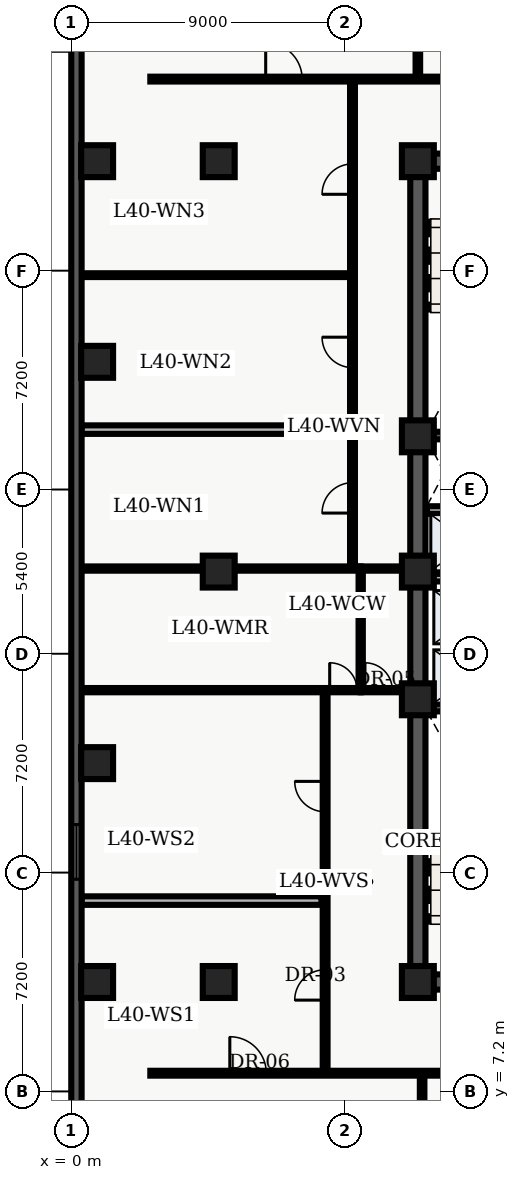
"""IFC4 building model, lengths in metres.
Left out: names, types, materials, properties, quantities, classifications, styles, units other than length and angle.
Written with IfcOpenShell. Run it as: python <this file> out.ifc"""

import sys

from ifc_helpers import new_model, entity, si_unit, converted_unit, direction, frame, origin_with_axes, origin_2d_with_axis, place, context, subcontext, project, spatial, polyline, rectangle, outline, extrude, element, fill, save


model = new_model("IFC4")
c1 = context("Model", 3, precision=1e-05, world=origin_with_axes(), true_north=direction((0.0, 1.0)))
c2 = subcontext(c1, "Body", "Model", "MODEL_VIEW")
j1 = project(units=[si_unit("LENGTHUNIT", "METRE"), converted_unit("PLANEANGLEUNIT", "DEGREE", entity("IfcPlaneAngleMeasure", 0.017), si_unit("PLANEANGLEUNIT", "RADIAN"), dimensions=[0, 0, 0, 0, 0, 0, 0])], contexts=[c1])
p1 = place(None, origin_with_axes())
s1 = spatial("IfcSite", under=j1, at=p1, CompositionType="ELEMENT")
p2 = place(p1, origin_with_axes())
s2 = spatial("IfcBuilding", under=s1, at=p2, CompositionType="ELEMENT")
p3 = place(p2, frame((0.0, 0.0, 164.1), z_axis=(0.0, 0.0, 1.0), x_axis=(1.0, 0.0, 0.0)))
s3 = spatial("IfcBuildingStorey", under=s2, at=p3, CompositionType="ELEMENT", Elevation=164.1)
p4 = place(p3, frame((11.4, 10.8, 0.0), z_axis=(0.0, 0.0, 1.0), x_axis=(0.0, 1.0, 0.0)))
e1 = element("IfcWall", 1, at=p4, inside=s3, PredefinedType="SHEAR", context=c2, shape_type="SweptSolid", body=[
    extrude(outline(polyline([(0.0, -0.25), (27.0, -0.25), (27.0, 0.25), (0.0, 0.25), (0.0, -0.25)])), origin_with_axes(), (0.0, 0.0, 1.0), 3.66),
])
p5 = place(p3, frame((11.4, 10.8, 0.0), z_axis=(0.0, 0.0, 1.0), x_axis=(1.0, 0.0, 0.0)))
e2 = element("IfcWall", 2, at=p5, inside=s3, PredefinedType="SHEAR", context=c2, shape_type="SweptSolid", body=[
    extrude(outline(polyline([(0.0, -0.25), (7.2, -0.25), (7.2, 0.25), (0.0, 0.25), (0.0, -0.25)])), origin_with_axes(), (0.0, 0.0, 1.0), 3.66),
])
p6 = place(p5, frame((2.625, 0.0, 0.0), z_axis=(0.0, 0.0, 1.0), x_axis=(1.0, 0.0, 0.0)))
e3 = element("IfcOpeningElement", 3, at=p6, cuts=e2, PredefinedType="OPENING", context=c2, shape_type="SweptSolid", body=[
    extrude(rectangle(XDim=1.05, YDim=0.52, at=origin_2d_with_axis()), origin_with_axes(), (0.0, 0.0, 1.0), 2.15),
])
p7 = place(p3, frame((11.4, 37.8, 0.0), z_axis=(0.0, 0.0, 1.0), x_axis=(1.0, 0.0, 0.0)))
e4 = element("IfcWall", 4, at=p7, inside=s3, PredefinedType="SHEAR", context=c2, shape_type="SweptSolid", body=[
    extrude(outline(polyline([(0.0, -0.25), (7.2, -0.25), (7.2, 0.25), (0.0, 0.25), (0.0, -0.25)])), origin_with_axes(), (0.0, 0.0, 1.0), 3.66),
])
p8 = place(p7, frame((2.625, 0.0, 0.0), z_axis=(0.0, 0.0, 1.0), x_axis=(1.0, 0.0, 0.0)))
e5 = element("IfcOpeningElement", 5, at=p8, cuts=e4, PredefinedType="OPENING", context=c2, shape_type="SweptSolid", body=[
    extrude(rectangle(XDim=1.05, YDim=0.52, at=origin_2d_with_axis()), origin_with_axes(), (0.0, 0.0, 1.0), 2.15),
])
for number, where, z_axis, x_axis in (
    (6, (11.65, 19.825, 0.0), (0.0, 0.0, 1.0), (1.0, 0.0, 0.0)),
    (7, (11.65, 28.775, 0.0), (0.0, 0.0, 1.0), (1.0, 0.0, 0.0)),
):
    element("IfcWall", number, at=place(p3, frame(where, z_axis=z_axis, x_axis=x_axis)), inside=s3, PredefinedType="SHEAR", context=c2, shape_type="SweptSolid", body=[
        extrude(outline(polyline([(0.0, -0.125), (6.7, -0.125), (6.7, 0.125), (0.0, 0.125), (0.0, -0.125)])), origin_with_axes(), (0.0, 0.0, 1.0), 3.66),
    ])
p9 = place(p3, frame((11.7, 24.1, 0.0), z_axis=(0.0, 0.0, 1.0), x_axis=(1.0, 0.0, 0.0)))
e8 = element("IfcWall", 8, at=p9, inside=s3, PredefinedType="SOLIDWALL", context=c2, shape_type="SweptSolid", body=[
    extrude(outline(polyline([(0.0, -0.125), (6.6, -0.125), (6.6, 0.125), (0.0, 0.125), (0.0, -0.125)])), origin_with_axes(), (0.0, 0.0, 1.0), 2.7),
])
p10 = place(p9, frame((3.75, 0.0, 0.0), z_axis=(0.0, 0.0, 1.0), x_axis=(1.0, 0.0, 0.0)))
e9 = element("IfcOpeningElement", 9, at=p10, cuts=e8, PredefinedType="OPENING", context=c2, shape_type="SweptSolid", body=[
    extrude(rectangle(XDim=0.9, YDim=0.27, at=origin_2d_with_axis()), origin_with_axes(), (0.0, 0.0, 1.0), 2.15),
])
p11 = place(p3, frame((11.7, 26.325, 0.0), z_axis=(0.0, 0.0, 1.0), x_axis=(1.0, 0.0, 0.0)))
e10 = element("IfcWall", 10, at=p11, inside=s3, PredefinedType="SOLIDWALL", context=c2, shape_type="SweptSolid", body=[
    extrude(outline(polyline([(0.0, -0.125), (6.6, -0.125), (6.6, 0.125), (0.0, 0.125), (0.0, -0.125)])), origin_with_axes(), (0.0, 0.0, 1.0), 2.7),
])
p12 = place(p11, frame((3.5, 0.0, 0.0), z_axis=(0.0, 0.0, 1.0), x_axis=(1.0, 0.0, 0.0)))
e11 = element("IfcOpeningElement", 11, at=p12, cuts=e10, PredefinedType="OPENING", context=c2, shape_type="SweptSolid", body=[
    extrude(rectangle(XDim=0.9, YDim=0.27, at=origin_2d_with_axis()), origin_with_axes(), (0.0, 0.0, 1.0), 2.15),
])
for number, where, z_axis, x_axis in (
    (12, (11.4, 10.8, 0.0), (0.0, 0.0, 1.0), (1.0, 0.0, 0.0)),
    (13, (11.4, 20.1, 0.0), (0.0, 0.0, 1.0), (1.0, 0.0, 0.0)),
    (14, (11.4, 24.3, 0.0), (0.0, 0.0, 1.0), (1.0, 0.0, 0.0)),
    (15, (11.4, 28.75, 0.0), (0.0, 0.0, 1.0), (1.0, 0.0, 0.0)),
    (16, (11.4, 37.8, 0.0), (0.0, 0.0, 1.0), (1.0, 0.0, 0.0)),
    (17, (4.85, 10.8, 0.0), (0.0, 0.0, 1.0), (1.0, 0.0, 0.0)),
    (18, (4.85, 24.3, 0.0), (0.0, 0.0, 1.0), (1.0, 0.0, 0.0)),
    (19, (4.85, 37.8, 0.0), (0.0, 0.0, 1.0), (1.0, 0.0, 0.0)),
    (20, (0.85, 10.8, 0.0), (0.0, 0.0, 1.0), (1.0, 0.0, 0.0)),
    (21, (0.85, 18.0, 0.0), (0.0, 0.0, 1.0), (1.0, 0.0, 0.0)),
    (22, (0.85, 31.2, 0.0), (0.0, 0.0, 1.0), (1.0, 0.0, 0.0)),
    (23, (0.85, 37.8, 0.0), (0.0, 0.0, 1.0), (1.0, 0.0, 0.0)),
):
    element("IfcColumn", number, at=place(p3, frame(where, z_axis=z_axis, x_axis=x_axis)), inside=s3, PredefinedType="COLUMN", context=c2, shape_type="SweptSolid", body=[
        extrude(rectangle(XDim=1.05, YDim=1.05, at=origin_2d_with_axis()), origin_with_axes(), (0.0, 0.0, 1.0), 3.9),
    ])
p13 = place(p3, frame((9.52, 20.4, 0.0), z_axis=(0.0, 0.0, 1.0), x_axis=(0.0, 1.0, 0.0)))
e24 = element("IfcWall", 24, at=p13, inside=s3, PredefinedType="PARTITIONING", context=c2, shape_type="SweptSolid", body=[
    extrude(outline(polyline([(0.0, -0.07), (4.0, -0.07), (4.0, 0.07), (0.0, 0.07), (0.0, -0.07)])), origin_with_axes(), (0.0, 0.0, 1.0), 2.7),
])
p14 = place(p3, frame((9.52, 20.4, 0.0), z_axis=(0.0, 0.0, 1.0), x_axis=(1.0, 0.0, 0.0)))
e25 = element("IfcWall", 25, at=p14, inside=s3, PredefinedType="PARTITIONING", context=c2, shape_type="SweptSolid", body=[
    extrude(outline(polyline([(0.0, -0.07), (1.58, -0.07), (1.58, 0.07), (0.0, 0.07), (0.0, -0.07)])), origin_with_axes(), (0.0, 0.0, 1.0), 2.7),
])
p15 = place(p14, frame((0.59, 0.0, 0.0), z_axis=(0.0, 0.0, 1.0), x_axis=(1.0, 0.0, 0.0)))
e26 = element("IfcOpeningElement", 26, at=p15, cuts=e25, PredefinedType="OPENING", context=c2, shape_type="SweptSolid", body=[
    extrude(rectangle(XDim=0.9, YDim=0.16, at=origin_2d_with_axis()), origin_with_axes(), (0.0, 0.0, 1.0), 2.15),
])
p16 = place(p3, frame((9.52, 24.4, 0.0), z_axis=(0.0, 0.0, 1.0), x_axis=(1.0, 0.0, 0.0)))
e27 = element("IfcWall", 27, at=p16, inside=s3, PredefinedType="PARTITIONING", context=c2, shape_type="SweptSolid", body=[
    extrude(outline(polyline([(0.0, -0.07), (1.58, -0.07), (1.58, 0.07), (0.0, 0.07), (0.0, -0.07)])), origin_with_axes(), (0.0, 0.0, 1.0), 2.7),
])
p17 = place(p3, frame((2.6, 7.8, 0.0), z_axis=(0.0, 0.0, 1.0), x_axis=(1.0, 0.0, 0.0)))
e28 = element("IfcWall", 28, at=p17, inside=s3, PredefinedType="PARTITIONING", context=c2, shape_type="SweptSolid", body=[
    extrude(outline(polyline([(0.0, -0.08), (18.55, -0.08), (18.55, 0.08), (0.0, 0.08), (0.0, -0.08)])), origin_with_axes(), (0.0, 0.0, 1.0), 2.7),
])
p18 = place(p17, frame((3.215, 0.0, 0.0), z_axis=(0.0, 0.0, 1.0), x_axis=(1.0, 0.0, 0.0)))
e29 = element("IfcOpeningElement", 29, at=p18, cuts=e28, PredefinedType="OPENING", context=c2, shape_type="SweptSolid", body=[
    extrude(rectangle(XDim=1.2, YDim=0.18, at=origin_2d_with_axis()), origin_with_axes(), (0.0, 0.0, 1.0), 2.2),
])
p19 = place(p17, frame((11.107, 0.0, 0.0), z_axis=(0.0, 0.0, 1.0), x_axis=(1.0, 0.0, 0.0)))
e30 = element("IfcOpeningElement", 30, at=p19, cuts=e28, PredefinedType="OPENING", context=c2, shape_type="SweptSolid", body=[
    extrude(rectangle(XDim=1.0, YDim=0.18, at=origin_2d_with_axis()), origin_with_axes(), (0.0, 0.0, 1.0), 2.15),
])
p20 = place(p17, frame((15.886, 0.0, 0.0), z_axis=(0.0, 0.0, 1.0), x_axis=(1.0, 0.0, 0.0)))
e31 = element("IfcOpeningElement", 31, at=p20, cuts=e28, PredefinedType="OPENING", context=c2, shape_type="SweptSolid", body=[
    extrude(rectangle(XDim=1.0, YDim=0.18, at=origin_2d_with_axis()), origin_with_axes(), (0.0, 0.0, 1.0), 2.15),
])
p21 = place(p3, frame((2.6, 40.5, 0.0), z_axis=(0.0, 0.0, 1.0), x_axis=(1.0, 0.0, 0.0)))
e32 = element("IfcWall", 32, at=p21, inside=s3, PredefinedType="PARTITIONING", context=c2, shape_type="SweptSolid", body=[
    extrude(outline(polyline([(0.0, -0.08), (20.884, -0.08), (20.884, 0.08), (0.0, 0.08), (0.0, -0.08)])), origin_with_axes(), (0.0, 0.0, 1.0), 2.7),
])
p22 = place(p21, frame((4.395, 0.0, 0.0), z_axis=(0.0, 0.0, 1.0), x_axis=(1.0, 0.0, 0.0)))
e33 = element("IfcOpeningElement", 33, at=p22, cuts=e32, PredefinedType="OPENING", context=c2, shape_type="SweptSolid", body=[
    extrude(rectangle(XDim=1.2, YDim=0.18, at=origin_2d_with_axis()), origin_with_axes(), (0.0, 0.0, 1.0), 2.2),
])
p23 = place(p21, frame((13.16, 0.0, 0.0), z_axis=(0.0, 0.0, 1.0), x_axis=(1.0, 0.0, 0.0)))
e34 = element("IfcOpeningElement", 34, at=p23, cuts=e32, PredefinedType="OPENING", context=c2, shape_type="SweptSolid", body=[
    extrude(rectangle(XDim=1.0, YDim=0.18, at=origin_2d_with_axis()), origin_with_axes(), (0.0, 0.0, 1.0), 2.15),
])
p24 = place(p3, frame((8.35, 7.8, 0.0), z_axis=(0.0, 0.0, 1.0), x_axis=(0.0, 1.0, 0.0)))
e35 = element("IfcWall", 35, at=p24, inside=s3, PredefinedType="PARTITIONING", context=c2, shape_type="SweptSolid", body=[
    extrude(outline(polyline([(0.0, -0.08), (12.6, -0.08), (12.6, 0.08), (0.0, 0.08), (0.0, -0.08)])), origin_with_axes(), (0.0, 0.0, 1.0), 2.7),
])
p25 = place(p24, frame((2.904, 0.0, 0.0), z_axis=(0.0, 0.0, 1.0), x_axis=(1.0, 0.0, 0.0)))
e36 = element("IfcOpeningElement", 36, at=p25, cuts=e35, PredefinedType="OPENING", context=c2, shape_type="SweptSolid", body=[
    extrude(rectangle(XDim=1.0, YDim=0.18, at=origin_2d_with_axis()), origin_with_axes(), (0.0, 0.0, 1.0), 2.15),
])
p26 = place(p24, frame((9.099, 0.0, 0.0), z_axis=(0.0, 0.0, 1.0), x_axis=(1.0, 0.0, 0.0)))
e37 = element("IfcOpeningElement", 37, at=p26, cuts=e35, PredefinedType="OPENING", context=c2, shape_type="SweptSolid", body=[
    extrude(rectangle(XDim=1.0, YDim=0.18, at=origin_2d_with_axis()), origin_with_axes(), (0.0, 0.0, 1.0), 2.15),
])
p27 = place(p3, frame((9.25, 24.4, 0.0), z_axis=(0.0, 0.0, 1.0), x_axis=(0.0, 1.0, 0.0)))
e38 = element("IfcWall", 38, at=p27, inside=s3, PredefinedType="PARTITIONING", context=c2, shape_type="SweptSolid", body=[
    extrude(outline(polyline([(0.0, -0.08), (16.1, -0.08), (16.1, 0.08), (0.0, 0.08), (0.0, -0.08)])), origin_with_axes(), (0.0, 0.0, 1.0), 2.7),
])
p28 = place(p27, frame((2.325, 0.0, 0.0), z_axis=(0.0, 0.0, 1.0), x_axis=(1.0, 0.0, 0.0)))
e39 = element("IfcOpeningElement", 39, at=p28, cuts=e38, PredefinedType="OPENING", context=c2, shape_type="SweptSolid", body=[
    extrude(rectangle(XDim=1.0, YDim=0.18, at=origin_2d_with_axis()), origin_with_axes(), (0.0, 0.0, 1.0), 2.15),
])
p29 = place(p27, frame((7.111, 0.0, 0.0), z_axis=(0.0, 0.0, 1.0), x_axis=(1.0, 0.0, 0.0)))
e40 = element("IfcOpeningElement", 40, at=p29, cuts=e38, PredefinedType="OPENING", context=c2, shape_type="SweptSolid", body=[
    extrude(rectangle(XDim=1.0, YDim=0.18, at=origin_2d_with_axis()), origin_with_axes(), (0.0, 0.0, 1.0), 2.15),
])
p30 = place(p27, frame((12.81, 0.0, 0.0), z_axis=(0.0, 0.0, 1.0), x_axis=(1.0, 0.0, 0.0)))
e41 = element("IfcOpeningElement", 41, at=p30, cuts=e38, PredefinedType="OPENING", context=c2, shape_type="SweptSolid", body=[
    extrude(rectangle(XDim=1.0, YDim=0.18, at=origin_2d_with_axis()), origin_with_axes(), (0.0, 0.0, 1.0), 2.15),
])
p31 = place(p3, frame((0.335, 20.4, 0.0), z_axis=(0.0, 0.0, 1.0), x_axis=(1.0, 0.0, 0.0)))
e42 = element("IfcWall", 42, at=p31, inside=s3, PredefinedType="PARTITIONING", context=c2, shape_type="SweptSolid", body=[
    extrude(outline(polyline([(0.0, -0.07), (9.185, -0.07), (9.185, 0.07), (0.0, 0.07), (0.0, -0.07)])), origin_with_axes(), (0.0, 0.0, 1.0), 2.7),
])
p32 = place(p31, frame((8.615, 0.0, 0.0), z_axis=(0.0, 0.0, 1.0), x_axis=(1.0, 0.0, 0.0)))
e43 = element("IfcOpeningElement", 43, at=p32, cuts=e42, PredefinedType="OPENING", context=c2, shape_type="SweptSolid", body=[
    extrude(rectangle(XDim=0.9, YDim=0.16, at=origin_2d_with_axis()), origin_with_axes(), (0.0, 0.0, 1.0), 2.15),
])
p33 = place(p3, frame((0.335, 24.4, 0.0), z_axis=(0.0, 0.0, 1.0), x_axis=(1.0, 0.0, 0.0)))
e44 = element("IfcWall", 44, at=p33, inside=s3, PredefinedType="PARTITIONING", context=c2, shape_type="SweptSolid", body=[
    extrude(outline(polyline([(0.0, -0.07), (9.185, -0.07), (9.185, 0.07), (0.0, 0.07), (0.0, -0.07)])), origin_with_axes(), (0.0, 0.0, 1.0), 2.7),
])
p34 = place(p3, frame((0.335, 13.478, 0.0), z_axis=(0.0, 0.0, 1.0), x_axis=(1.0, 0.0, 0.0)))
e45 = element("IfcWall", 45, at=p34, inside=s3, PredefinedType="PARTITIONING", context=c2, shape_type="SweptSolid", body=[
    extrude(outline(polyline([(0.0, -0.14), (7.895, -0.14), (7.895, 0.14), (0.0, 0.14), (0.0, -0.14)])), origin_with_axes(), (0.0, 0.0, 1.0), 2.7),
])
p35 = place(p3, frame((0.335, 28.97, 0.0), z_axis=(0.0, 0.0, 1.0), x_axis=(1.0, 0.0, 0.0)))
e46 = element("IfcWall", 46, at=p35, inside=s3, PredefinedType="PARTITIONING", context=c2, shape_type="SweptSolid", body=[
    extrude(outline(polyline([(0.0, -0.14), (8.795, -0.14), (8.795, 0.14), (0.0, 0.14), (0.0, -0.14)])), origin_with_axes(), (0.0, 0.0, 1.0), 2.7),
])
p36 = place(p3, frame((0.335, 34.051, 0.0), z_axis=(0.0, 0.0, 1.0), x_axis=(1.0, 0.0, 0.0)))
e47 = element("IfcWall", 47, at=p36, inside=s3, PredefinedType="PARTITIONING", context=c2, shape_type="SweptSolid", body=[
    extrude(outline(polyline([(0.0, -0.062), (8.795, -0.062), (8.795, 0.062), (0.0, 0.062), (0.0, -0.062)])), origin_with_axes(), (0.0, 0.0, 1.0), 2.7),
])
p37 = place(p3, frame((11.54, 0.335, 0.0), z_axis=(0.0, 0.0, 1.0), x_axis=(0.0, 1.0, 0.0)))
e48 = element("IfcWall", 48, at=p37, inside=s3, PredefinedType="PARTITIONING", context=c2, shape_type="SweptSolid", body=[
    extrude(outline(polyline([(0.0, -0.075), (7.365, -0.075), (7.365, 0.075), (0.0, 0.075), (0.0, -0.075)])), origin_with_axes(), (0.0, 0.0, 1.0), 2.7),
])
p38 = place(p3, frame((11.4, 40.6, 0.0), z_axis=(0.0, 0.0, 1.0), x_axis=(0.0, 1.0, 0.0)))
e49 = element("IfcWall", 49, at=p38, inside=s3, PredefinedType="PARTITIONING", context=c2, shape_type="SweptSolid", body=[
    extrude(outline(polyline([(0.0, -0.075), (7.665, -0.075), (7.665, 0.075), (0.0, 0.075), (0.0, -0.075)])), origin_with_axes(), (0.0, 0.0, 1.0), 2.7),
])
p39 = place(p3, frame((0.17, 2.74, 0.0), z_axis=(0.0, 0.0, 1.0), x_axis=(0.0, 1.0, 0.0)))
e50 = element("IfcWall", 50, at=p39, inside=s3, PredefinedType="SOLIDWALL", context=c2, shape_type="SweptSolid", body=[
    extrude(outline(polyline([(0.0, -0.17), (43.46, -0.17), (43.46, 0.17), (0.0, 0.17), (0.0, -0.17)])), origin_with_axes(), (0.0, 0.0, 1.0), 3.66),
])
p40 = place(p39, frame((2.948, 0.0, 0.45), z_axis=(0.0, 0.0, 1.0), x_axis=(1.0, 0.0, 0.0)))
e51 = element("IfcOpeningElement", 51, at=p40, cuts=e50, PredefinedType="OPENING", context=c2, shape_type="SweptSolid", body=[
    extrude(rectangle(XDim=1.8, YDim=0.36, at=origin_2d_with_axis()), origin_with_axes(), (0.0, 0.0, 1.0), 2.1),
])
p41 = place(p39, frame((12.339, 0.0, 0.45), z_axis=(0.0, 0.0, 1.0), x_axis=(1.0, 0.0, 0.0)))
e52 = element("IfcOpeningElement", 52, at=p41, cuts=e50, PredefinedType="OPENING", context=c2, shape_type="SweptSolid", body=[
    extrude(rectangle(XDim=1.8, YDim=0.36, at=origin_2d_with_axis()), origin_with_axes(), (0.0, 0.0, 1.0), 2.1),
])
p42 = place(p39, frame((40.062, 0.0, 0.45), z_axis=(0.0, 0.0, 1.0), x_axis=(1.0, 0.0, 0.0)))
e53 = element("IfcOpeningElement", 53, at=p42, cuts=e50, PredefinedType="OPENING", context=c2, shape_type="SweptSolid", body=[
    extrude(rectangle(XDim=1.8, YDim=0.36, at=origin_2d_with_axis()), origin_with_axes(), (0.0, 0.0, 1.0), 2.1),
])
p43 = place(p14, frame((0.59, 0.0, 0.0), z_axis=(0.0, 0.0, 1.0), x_axis=(1.0, 0.0, 0.0)))
e54 = element("IfcDoor", 54, at=p43, inside=s3, OperationType="SINGLE_SWING_LEFT", PredefinedType="DOOR", context=c2, shape_type="SweptSolid", body=[
    extrude(rectangle(XDim=0.9, YDim=0.084, at=origin_2d_with_axis()), origin_with_axes(), (0.0, 0.0, 1.0), 2.15),
])
fill(e26, e54)
p44 = place(p31, frame((8.615, 0.0, 0.0), z_axis=(0.0, 0.0, 1.0), x_axis=(1.0, 0.0, 0.0)))
e55 = element("IfcDoor", 55, at=p44, inside=s3, OperationType="SINGLE_SWING_LEFT", PredefinedType="DOOR", context=c2, shape_type="SweptSolid", body=[
    extrude(rectangle(XDim=0.9, YDim=0.084, at=origin_2d_with_axis()), origin_with_axes(), (0.0, 0.0, 1.0), 2.15),
])
fill(e43, e55)
p45 = place(p24, frame((2.904, 0.0, 0.0), z_axis=(0.0, 0.0, 1.0), x_axis=(1.0, 0.0, 0.0)))
e56 = element("IfcDoor", 56, at=p45, inside=s3, OperationType="SINGLE_SWING_LEFT", PredefinedType="DOOR", context=c2, shape_type="SweptSolid", body=[
    extrude(rectangle(XDim=1.0, YDim=0.09, at=origin_2d_with_axis()), origin_with_axes(), (0.0, 0.0, 1.0), 2.15),
])
fill(e36, e56)
p46 = place(p24, frame((9.099, 0.0, 0.0), z_axis=(0.0, 0.0, 1.0), x_axis=(1.0, 0.0, 0.0)))
e57 = element("IfcDoor", 57, at=p46, inside=s3, OperationType="SINGLE_SWING_RIGHT", PredefinedType="DOOR", context=c2, shape_type="SweptSolid", body=[
    extrude(rectangle(XDim=1.0, YDim=0.09, at=origin_2d_with_axis()), origin_with_axes(), (0.0, 0.0, 1.0), 2.15),
])
fill(e37, e57)
p47 = place(p27, frame((2.325, 0.0, 0.0), z_axis=(0.0, 0.0, 1.0), x_axis=(1.0, 0.0, 0.0)))
e58 = element("IfcDoor", 58, at=p47, inside=s3, OperationType="SINGLE_SWING_LEFT", PredefinedType="DOOR", context=c2, shape_type="SweptSolid", body=[
    extrude(rectangle(XDim=1.0, YDim=0.09, at=origin_2d_with_axis()), origin_with_axes(), (0.0, 0.0, 1.0), 2.15),
])
fill(e39, e58)
p48 = place(p27, frame((7.111, 0.0, 0.0), z_axis=(0.0, 0.0, 1.0), x_axis=(1.0, 0.0, 0.0)))
e59 = element("IfcDoor", 59, at=p48, inside=s3, OperationType="SINGLE_SWING_RIGHT", PredefinedType="DOOR", context=c2, shape_type="SweptSolid", body=[
    extrude(rectangle(XDim=1.0, YDim=0.09, at=origin_2d_with_axis()), origin_with_axes(), (0.0, 0.0, 1.0), 2.15),
])
fill(e40, e59)
p49 = place(p27, frame((12.81, 0.0, 0.0), z_axis=(0.0, 0.0, 1.0), x_axis=(1.0, 0.0, 0.0)))
e60 = element("IfcDoor", 60, at=p49, inside=s3, OperationType="SINGLE_SWING_LEFT", PredefinedType="DOOR", context=c2, shape_type="SweptSolid", body=[
    extrude(rectangle(XDim=1.0, YDim=0.09, at=origin_2d_with_axis()), origin_with_axes(), (0.0, 0.0, 1.0), 2.15),
])
fill(e41, e60)
p50 = place(p17, frame((3.215, 0.0, 0.0), z_axis=(0.0, 0.0, 1.0), x_axis=(1.0, 0.0, 0.0)))
e61 = element("IfcDoor", 61, at=p50, inside=s3, OperationType="SINGLE_SWING_LEFT", PredefinedType="DOOR", context=c2, shape_type="SweptSolid", body=[
    extrude(rectangle(XDim=1.2, YDim=0.09, at=origin_2d_with_axis()), origin_with_axes(), (0.0, 0.0, 1.0), 2.2),
])
fill(e29, e61)
p51 = place(p21, frame((4.395, 0.0, 0.0), z_axis=(0.0, 0.0, 1.0), x_axis=(1.0, 0.0, 0.0)))
e62 = element("IfcDoor", 62, at=p51, inside=s3, OperationType="SINGLE_SWING_LEFT", PredefinedType="DOOR", context=c2, shape_type="SweptSolid", body=[
    extrude(rectangle(XDim=1.2, YDim=0.09, at=origin_2d_with_axis()), origin_with_axes(), (0.0, 0.0, 1.0), 2.2),
])
fill(e33, e62)
p52 = place(p39, frame((12.339, 0.0, 0.45), z_axis=(0.0, 0.0, 1.0), x_axis=(1.0, 0.0, 0.0)))
e63 = element("IfcWindow", 63, at=p52, inside=s3, PredefinedType="WINDOW", context=c2, shape_type="SweptSolid", body=[
    extrude(rectangle(XDim=1.8, YDim=0.09, at=origin_2d_with_axis()), origin_with_axes(), (0.0, 0.0, 1.0), 2.1),
])
fill(e52, e63)
save(model, sys.argv[1])
